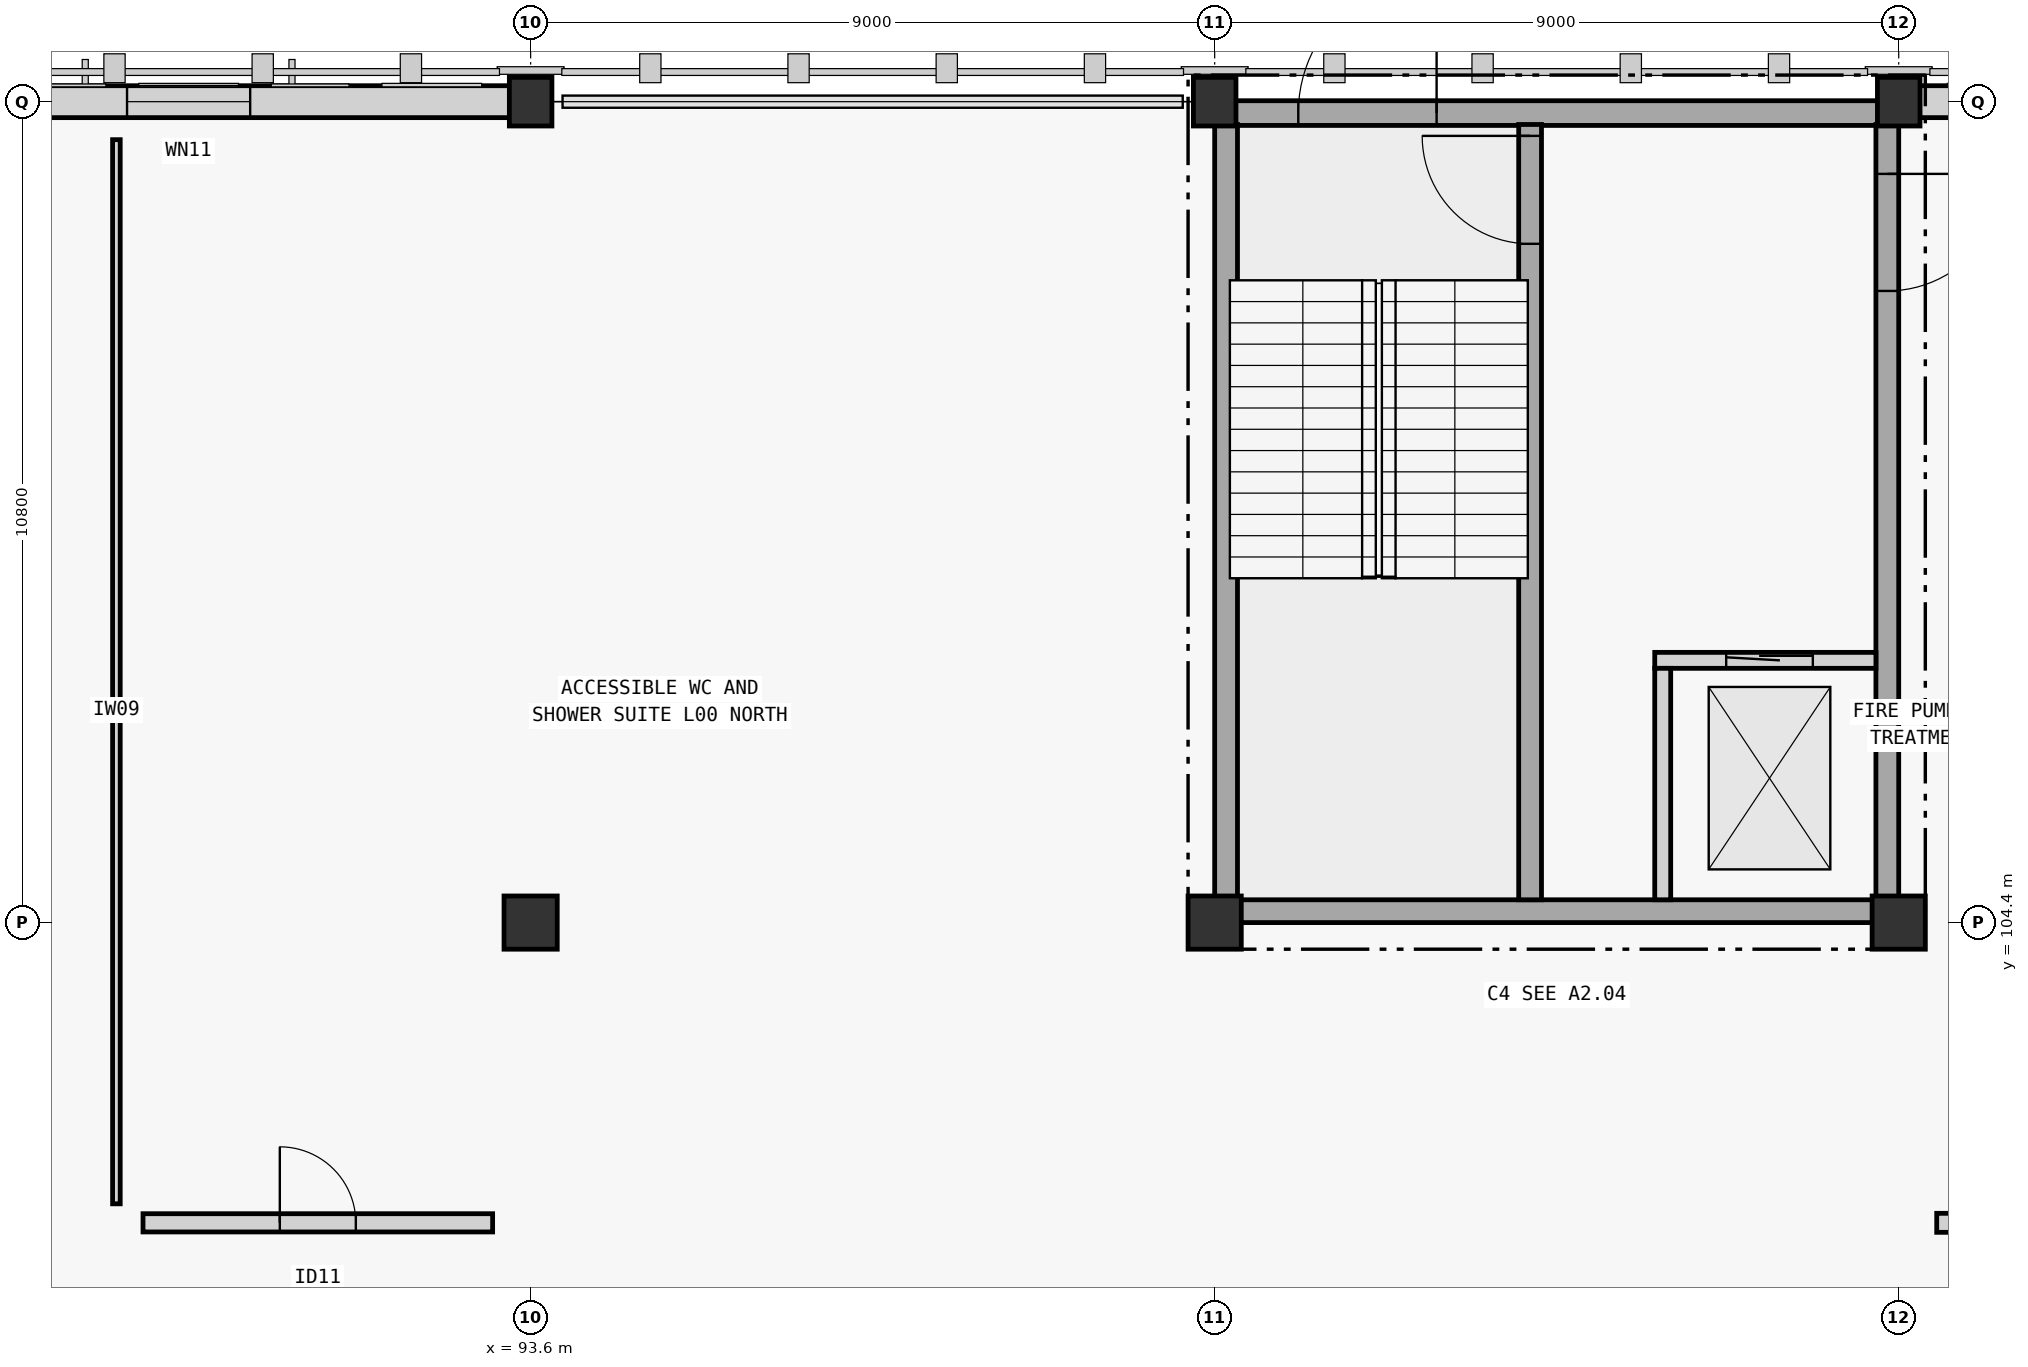
"""IFC4 building model, lengths in metres.
Left out: names, types, materials, properties, quantities, classifications, styles, units other than length and angle.
Written with IfcOpenShell. Run it as: python <this file> out.ifc"""

import sys

from ifc_helpers import new_model, si_unit, direction, frame, frame_2d, origin, origin_2d, place, context, subcontext, project, spatial, rectangle, extrude, element, fill, save


model = new_model("IFC4")
c1 = context("Model", 3, precision=1e-05, world=origin(), true_north=direction((0.0, 1.0)))
c2 = subcontext(c1, "Body", "Model", "MODEL_VIEW")
j1 = project(units=[si_unit("LENGTHUNIT", "METRE"), si_unit("PLANEANGLEUNIT", "RADIAN")], contexts=[c1])
p1 = place(None, origin())
s1 = spatial("IfcSite", under=j1, at=p1, CompositionType="ELEMENT")
p2 = place(p1, origin())
s2 = spatial("IfcBuilding", under=s1, at=p2, CompositionType="ELEMENT")
p3 = place(p2, origin())
s3 = spatial("IfcBuildingStorey", under=s2, at=p3, CompositionType="ELEMENT", Elevation=0.0)
p4 = place(p3, frame((93.6, 104.4, -0.3), z_axis=(0.0, 0.0, 1.0), x_axis=(1.0, 0.0, 0.0)))
e1 = element("IfcColumn", 1, at=p4, inside=s3, PredefinedType="COLUMN", context=c2, shape_type="SweptSolid", body=[
    extrude(rectangle(XDim=0.7, YDim=0.7, at=origin_2d()), origin(), (0.0, 0.0, 1.0), 5.7),
])
p5 = place(p3, frame((93.6, 115.2, -0.3), z_axis=(0.0, 0.0, 1.0), x_axis=(1.0, 0.0, 0.0)))
e2 = element("IfcColumn", 2, at=p5, inside=s3, PredefinedType="COLUMN", context=c2, shape_type="SweptSolid", body=[
    extrude(rectangle(XDim=0.56, YDim=0.64, at=origin_2d()), origin(), (0.0, 0.0, 1.0), 5.7),
])
p6 = place(p3, frame((102.6, 104.4, -0.3), z_axis=(0.0, 0.0, 1.0), x_axis=(1.0, 0.0, 0.0)))
e3 = element("IfcColumn", 3, at=p6, inside=s3, PredefinedType="COLUMN", context=c2, shape_type="SweptSolid", body=[
    extrude(rectangle(XDim=0.7, YDim=0.7, at=origin_2d()), origin(), (0.0, 0.0, 1.0), 5.7),
])
p7 = place(p3, frame((102.6, 115.2, -0.3), z_axis=(0.0, 0.0, 1.0), x_axis=(1.0, 0.0, 0.0)))
e4 = element("IfcColumn", 4, at=p7, inside=s3, PredefinedType="COLUMN", context=c2, shape_type="SweptSolid", body=[
    extrude(rectangle(XDim=0.56, YDim=0.64, at=origin_2d()), origin(), (0.0, 0.0, 1.0), 5.7),
])
p8 = place(p3, frame((111.6, 104.4, -0.3), z_axis=(0.0, 0.0, 1.0), x_axis=(1.0, 0.0, 0.0)))
e5 = element("IfcColumn", 5, at=p8, inside=s3, PredefinedType="COLUMN", context=c2, shape_type="SweptSolid", body=[
    extrude(rectangle(XDim=0.7, YDim=0.7, at=origin_2d()), origin(), (0.0, 0.0, 1.0), 5.7),
])
p9 = place(p3, frame((111.6, 115.2, -0.3), z_axis=(0.0, 0.0, 1.0), x_axis=(1.0, 0.0, 0.0)))
e6 = element("IfcColumn", 6, at=p9, inside=s3, PredefinedType="COLUMN", context=c2, shape_type="SweptSolid", body=[
    extrude(rectangle(XDim=0.56, YDim=0.64, at=origin_2d()), origin(), (0.0, 0.0, 1.0), 5.7),
])
p10 = place(p3, frame((111.6, 104.55, 0.0), z_axis=(0.0, 0.0, 1.0), x_axis=(-1.0, 0.0, 0.0)))
e7 = element("IfcWall", 7, at=p10, inside=s3, PredefinedType="SHEAR", context=c2, shape_type="SweptSolid", body=[
    extrude(rectangle(XDim=9.0, YDim=0.3, at=frame_2d((4.5, 0.0))), origin(), (0.0, 0.0, 1.0), 5.4),
])
p11 = place(p3, frame((102.6, 115.05, 0.0), z_axis=(0.0, 0.0, 1.0), x_axis=(1.0, 0.0, 0.0)))
e8 = element("IfcWall", 8, at=p11, inside=s3, PredefinedType="SHEAR", context=c2, shape_type="SweptSolid", body=[
    extrude(rectangle(XDim=9.0, YDim=0.325, at=frame_2d((4.5, 0.0))), origin(), (0.0, 0.0, 1.0), 5.4),
])
p12 = place(p11, frame((1.1, 0.0, 0.0)))
e9 = element("IfcOpeningElement", 9, at=p12, cuts=e8, PredefinedType="OPENING", context=c2, shape_type="SweptSolid", body=[
    extrude(rectangle(XDim=1.82, YDim=2.22, at=frame_2d((0.91, 1.11))), frame((0.0, 0.163, 0.0), z_axis=(0.0, -1.0, 0.0), x_axis=(1.0, 0.0, 0.0)), (0.0, 0.0, 1.0), 0.325),
])
p13 = place(p3, frame((102.75, 104.7, 0.0), z_axis=(0.0, 0.0, 1.0), x_axis=(0.0, 1.0, 0.0)))
e10 = element("IfcWall", 10, at=p13, inside=s3, PredefinedType="SHEAR", context=c2, shape_type="SweptSolid", body=[
    extrude(rectangle(XDim=10.2, YDim=0.3, at=frame_2d((5.1, 0.0))), origin(), (0.0, 0.0, 1.0), 5.4),
])
p14 = place(p3, frame((111.45, 114.9, 0.0), z_axis=(0.0, 0.0, 1.0), x_axis=(0.0, -1.0, 0.0)))
e11 = element("IfcWall", 11, at=p14, inside=s3, PredefinedType="SHEAR", context=c2, shape_type="SweptSolid", body=[
    extrude(rectangle(XDim=10.2, YDim=0.3, at=frame_2d((5.1, 0.0))), origin(), (0.0, 0.0, 1.0), 5.4),
])
p15 = place(p14, frame((0.65, 0.0, 0.0)))
e12 = element("IfcOpeningElement", 12, at=p15, cuts=e11, PredefinedType="OPENING", context=c2, shape_type="SweptSolid", body=[
    extrude(rectangle(XDim=1.54, YDim=2.22, at=frame_2d((0.77, 1.11))), frame((0.0, 0.15, 0.0), z_axis=(0.0, -1.0, 0.0), x_axis=(1.0, 0.0, 0.0)), (0.0, 0.0, 1.0), 0.3),
])
p16 = place(p3, frame((106.75, 104.7, 0.0), z_axis=(0.0, 0.0, 1.0), x_axis=(0.0, 1.0, 0.0)))
e13 = element("IfcWall", 13, at=p16, inside=s3, PredefinedType="SHEAR", context=c2, shape_type="SweptSolid", body=[
    extrude(rectangle(XDim=10.2, YDim=0.3, at=frame_2d((5.1, 0.0))), origin(), (0.0, 0.0, 1.0), 5.4),
])
p17 = place(p16, frame((8.63, 0.0, 0.0)))
e14 = element("IfcOpeningElement", 14, at=p17, cuts=e13, PredefinedType="OPENING", context=c2, shape_type="SweptSolid", body=[
    extrude(rectangle(XDim=1.42, YDim=2.2, at=frame_2d((0.71, 1.1))), frame((0.0, 0.15, 0.0), z_axis=(0.0, -1.0, 0.0), x_axis=(1.0, 0.0, 0.0)), (0.0, 0.0, 1.0), 0.3),
])
p18 = place(p3, frame((84.876, 115.2, 0.0), z_axis=(0.0, 0.0, 1.0), x_axis=(1.0, 0.0, 0.0)))
e15 = element("IfcWall", 15, at=p18, inside=s3, PredefinedType="STANDARD", context=c2, shape_type="SweptSolid", body=[
    extrude(rectangle(XDim=8.448, YDim=0.42, at=frame_2d((4.224, 0.0))), origin(), (0.0, 0.0, 1.0), 4.515),
])
p19 = place(p18, frame((3.414, 0.0, 0.9)))
e16 = element("IfcOpeningElement", 16, at=p19, cuts=e15, PredefinedType="OPENING", context=c2, shape_type="SweptSolid", body=[
    extrude(rectangle(XDim=1.62, YDim=1.72, at=frame_2d((0.81, 0.86))), frame((0.0, 0.21, 0.0), z_axis=(0.0, -1.0, 0.0), x_axis=(1.0, 0.0, 0.0)), (0.0, 0.0, 1.0), 0.42),
])
p20 = place(p3, frame((111.876, 115.2, 0.0), z_axis=(0.0, 0.0, 1.0), x_axis=(1.0, 0.0, 0.0)))
e17 = element("IfcWall", 17, at=p20, inside=s3, PredefinedType="STANDARD", context=c2, shape_type="SweptSolid", body=[
    extrude(rectangle(XDim=6.648, YDim=0.42, at=frame_2d((3.324, 0.0))), origin(), (0.0, 0.0, 1.0), 4.515),
])
p21 = place(p20, frame((2.554, 0.0, 0.9)))
e18 = element("IfcOpeningElement", 18, at=p21, cuts=e17, PredefinedType="OPENING", context=c2, shape_type="SweptSolid", body=[
    extrude(rectangle(XDim=1.54, YDim=0.86, at=frame_2d((0.77, 0.43))), frame((0.0, 0.21, 0.0), z_axis=(0.0, -1.0, 0.0), x_axis=(1.0, 0.0, 0.0)), (0.0, 0.0, 1.0), 0.42),
])
p22 = place(p3, frame((108.39, 107.85, 0.0), z_axis=(0.0, 0.0, 1.0), x_axis=(1.0, 0.0, 0.0)))
e19 = element("IfcWall", 19, at=p22, inside=s3, PredefinedType="STANDARD", context=c2, shape_type="SweptSolid", body=[
    extrude(rectangle(XDim=2.91, YDim=0.21, at=frame_2d((1.455, 0.0))), origin(), (0.0, 0.0, 1.0), 5.4),
])
p23 = place(p22, frame((0.94, 0.0, 0.0)))
e20 = element("IfcOpeningElement", 20, at=p23, cuts=e19, PredefinedType="OPENING", context=c2, shape_type="SweptSolid", body=[
    extrude(rectangle(XDim=1.14, YDim=2.16, at=frame_2d((0.57, 1.08))), frame((0.0, 0.105, 0.0), z_axis=(0.0, -1.0, 0.0), x_axis=(1.0, 0.0, 0.0)), (0.0, 0.0, 1.0), 0.21),
])
p24 = place(p3, frame((108.495, 104.7, 0.0), z_axis=(0.0, 0.0, 1.0), x_axis=(0.0, 1.0, 0.0)))
e21 = element("IfcWall", 21, at=p24, inside=s3, PredefinedType="STANDARD", context=c2, shape_type="SweptSolid", body=[
    extrude(rectangle(XDim=3.045, YDim=0.21, at=frame_2d((1.522, 0.0))), origin(), (0.0, 0.0, 1.0), 5.4),
])
p25 = place(p3, frame((88.5, 100.45, 0.0), z_axis=(0.0, 0.0, 1.0), x_axis=(1.0, 0.0, 0.0)))
e22 = element("IfcWall", 22, at=p25, inside=s3, PredefinedType="PLUMBINGWALL", context=c2, shape_type="SweptSolid", body=[
    extrude(rectangle(XDim=4.6, YDim=0.24, at=frame_2d((2.3, 0.0))), origin(), (0.0, 0.0, 1.0), 4.2),
])
p26 = place(p25, frame((1.8, 0.0, 0.0)))
e23 = element("IfcOpeningElement", 23, at=p26, cuts=e22, PredefinedType="OPENING", context=c2, shape_type="SweptSolid", body=[
    extrude(rectangle(XDim=1.0, YDim=2.15, at=frame_2d((0.5, 1.075))), frame((0.0, 0.12, 0.0), z_axis=(0.0, -1.0, 0.0), x_axis=(1.0, 0.0, 0.0)), (0.0, 0.0, 1.0), 0.24),
])
p27 = place(p3, frame((112.1, 100.45, 0.0), z_axis=(0.0, 0.0, 1.0), x_axis=(1.0, 0.0, 0.0)))
e24 = element("IfcWall", 24, at=p27, inside=s3, PredefinedType="STANDARD", context=c2, shape_type="SweptSolid", body=[
    extrude(rectangle(XDim=6.2, YDim=0.25, at=frame_2d((3.1, 0.0))), origin(), (0.0, 0.0, 1.0), 4.2),
])
p28 = place(p27, frame((2.2, 0.0, 0.0)))
e25 = element("IfcOpeningElement", 25, at=p28, cuts=e24, PredefinedType="OPENING", context=c2, shape_type="SweptSolid", body=[
    extrude(rectangle(XDim=1.8, YDim=2.3, at=frame_2d((0.9, 1.15))), frame((0.0, 0.125, 0.0), z_axis=(0.0, -1.0, 0.0), x_axis=(1.0, 0.0, 0.0)), (0.0, 0.0, 1.0), 0.25),
])
p29 = place(p3, frame((88.15, 100.7, 0.0), z_axis=(0.0, 0.0, 1.0), x_axis=(0.0, 1.0, 0.0)))
e26 = element("IfcWall", 26, at=p29, inside=s3, PredefinedType="STANDARD", context=c2, shape_type="SweptSolid", body=[
    extrude(rectangle(XDim=14.0, YDim=0.1, at=frame_2d((7.0, 0.0))), origin(), (0.0, 0.0, 1.0), 4.2),
])
p30 = place(p12, origin())
e27 = element("IfcDoor", 27, at=p30, inside=s3, OperationType="SINGLE_SWING_RIGHT", PredefinedType="DOOR", context=c2, shape_type="SweptSolid", body=[
    extrude(rectangle(XDim=1.82, YDim=2.22, at=frame_2d((0.91, 1.11))), frame((0.0, 0.025, 0.0), z_axis=(0.0, -1.0, 0.0), x_axis=(1.0, 0.0, 0.0)), (0.0, 0.0, 1.0), 0.05),
])
fill(e9, e27)
p31 = place(p19, origin())
e28 = element("IfcWindow", 28, at=p31, inside=s3, PartitioningType="SINGLE_PANEL", PredefinedType="WINDOW", context=c2, shape_type="SweptSolid", body=[
    extrude(rectangle(XDim=1.62, YDim=1.72, at=frame_2d((0.81, 0.86))), frame((0.0, 0.03, 0.0), z_axis=(0.0, -1.0, 0.0), x_axis=(1.0, 0.0, 0.0)), (0.0, 0.0, 1.0), 0.06),
])
fill(e16, e28)
p32 = place(p23, origin())
e29 = element("IfcDoor", 29, at=p32, inside=s3, OperationType="SLIDING_TO_LEFT", PredefinedType="DOOR", context=c2, shape_type="SweptSolid", body=[
    extrude(rectangle(XDim=1.14, YDim=2.16, at=frame_2d((0.57, 1.08))), frame((0.0, 0.025, 0.0), z_axis=(0.0, -1.0, 0.0), x_axis=(1.0, 0.0, 0.0)), (0.0, 0.0, 1.0), 0.05),
])
fill(e20, e29)
p33 = place(p17, origin())
e30 = element("IfcDoor", 30, at=p33, inside=s3, OperationType="SINGLE_SWING_RIGHT", PredefinedType="DOOR", context=c2, shape_type="SweptSolid", body=[
    extrude(rectangle(XDim=1.42, YDim=2.2, at=frame_2d((0.71, 1.1))), frame((0.0, 0.025, 0.0), z_axis=(0.0, -1.0, 0.0), x_axis=(1.0, 0.0, 0.0)), (0.0, 0.0, 1.0), 0.05),
])
fill(e14, e30)
p34 = place(p15, origin())
e31 = element("IfcDoor", 31, at=p34, inside=s3, OperationType="SINGLE_SWING_LEFT", PredefinedType="DOOR", context=c2, shape_type="SweptSolid", body=[
    extrude(rectangle(XDim=1.54, YDim=2.22, at=frame_2d((0.77, 1.11))), frame((0.0, 0.025, 0.0), z_axis=(0.0, -1.0, 0.0), x_axis=(1.0, 0.0, 0.0)), (0.0, 0.0, 1.0), 0.05),
])
fill(e12, e31)
p35 = place(p26, origin())
e32 = element("IfcDoor", 32, at=p35, inside=s3, OperationType="SINGLE_SWING_LEFT", PredefinedType="DOOR", context=c2, shape_type="SweptSolid", body=[
    extrude(rectangle(XDim=1.0, YDim=2.15, at=frame_2d((0.5, 1.075))), frame((0.0, 0.025, 0.0), z_axis=(0.0, -1.0, 0.0), x_axis=(1.0, 0.0, 0.0)), (0.0, 0.0, 1.0), 0.05),
])
fill(e23, e32)
save(model, sys.argv[1])
